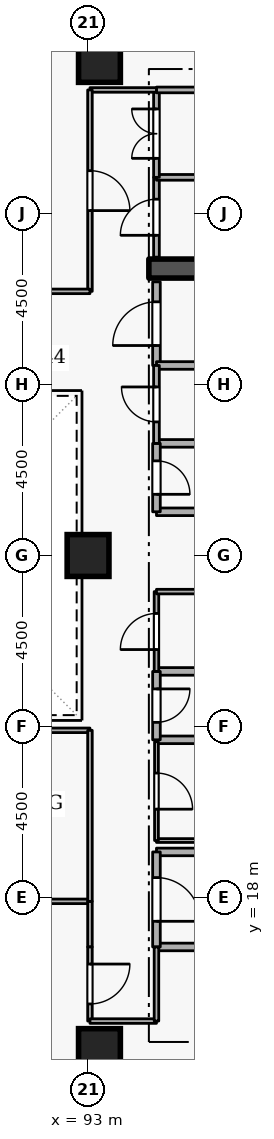
"""IFC4 building model, lengths in metres.
Left out: names, types, materials, properties, quantities, classifications, styles, units other than length and angle.
Written with IfcOpenShell. Run it as: python <this file> out.ifc"""

import sys

from ifc_helpers import new_model, si_unit, direction, frame, frame_2d, origin, origin_2d, place, context, subcontext, project, spatial, rectangle, extrude, element, fill, save


model = new_model("IFC4")
c1 = context("Model", 3, precision=1e-05, world=origin(), true_north=direction((0.0, 1.0)))
c2 = subcontext(c1, "Body", "Model", "MODEL_VIEW")
j1 = project(units=[si_unit("LENGTHUNIT", "METRE"), si_unit("PLANEANGLEUNIT", "RADIAN")], contexts=[c1])
p1 = place(None, origin())
s1 = spatial("IfcSite", under=j1, at=p1, CompositionType="ELEMENT")
p2 = place(p1, origin())
s2 = spatial("IfcBuilding", under=s1, at=p2, CompositionType="ELEMENT")
p3 = place(p2, frame((0.0, 0.0, 189.3)))
s3 = spatial("IfcBuildingStorey", under=s2, at=p3, CompositionType="ELEMENT", Elevation=189.3)
p4 = place(p3, frame((94.6, 34.55, 0.0), z_axis=(0.0, 0.0, 1.0), x_axis=(1.0, 0.0, 0.0)))
e1 = element("IfcWall", 1, at=p4, inside=s3, PredefinedType="SHEAR", context=c2, shape_type="SweptSolid", body=[
    extrude(rectangle(XDim=5.8, YDim=0.5, at=frame_2d((2.9, 0.0))), origin(), (0.0, 0.0, 1.0), 3.6),
])
for number, where, z_axis, x_axis in (
    (2, (93.3, 14.0, 0.0), (0.0, 0.0, 1.0), (1.0, 0.0, 0.0)),
    (3, (93.3, 40.0, 0.0), (0.0, 0.0, 1.0), (1.0, 0.0, 0.0)),
    (4, (93.0, 27.0, 0.0), (0.0, 0.0, 1.0), (1.0, 0.0, 0.0)),
):
    element("IfcColumn", number, at=place(p3, frame(where, z_axis=z_axis, x_axis=x_axis)), inside=s3, PredefinedType="COLUMN", context=c2, shape_type="SweptSolid", body=[
        extrude(rectangle(XDim=1.1, YDim=1.1, at=origin_2d()), origin(), (0.0, 0.0, 1.0), 3.6),
    ])
p5 = place(p3, frame((94.8, 16.7, 0.0), z_axis=(0.0, 0.0, 1.0), x_axis=(1.0, 0.0, 0.0)))
e5 = element("IfcWall", 5, at=p5, inside=s3, PredefinedType="STANDARD", context=c2, shape_type="SweptSolid", body=[
    extrude(rectangle(XDim=5.7, YDim=0.2, at=frame_2d((2.85, 0.0))), origin(), (0.0, 0.0, 1.0), 3.34),
])
p6 = place(p3, frame((97.1, 19.2, 0.0), z_axis=(0.0, 0.0, 1.0), x_axis=(-1.0, 0.0, 0.0)))
e6 = element("IfcWall", 6, at=p6, inside=s3, PredefinedType="STANDARD", context=c2, shape_type="SweptSolid", body=[
    extrude(rectangle(XDim=2.3, YDim=0.2, at=frame_2d((1.15, 0.0))), origin(), (0.0, 0.0, 1.0), 2.545),
])
p7 = place(p3, frame((94.8, 19.2, 0.0), z_axis=(0.0, 0.0, 1.0), x_axis=(0.0, -1.0, 0.0)))
e7 = element("IfcWall", 7, at=p7, inside=s3, PredefinedType="STANDARD", context=c2, shape_type="SweptSolid", body=[
    extrude(rectangle(XDim=2.5, YDim=0.2, at=frame_2d((1.25, 0.0))), origin(), (0.0, 0.0, 1.0), 3.34),
])
p8 = place(p7, frame((0.675, 0.0, 0.0)))
e8 = element("IfcOpeningElement", 8, at=p8, cuts=e7, PredefinedType="OPENING", context=c2, shape_type="SweptSolid", body=[
    extrude(rectangle(XDim=1.15, YDim=2.1, at=frame_2d((0.575, 1.05))), frame((0.0, 0.11, 0.0), z_axis=(0.0, -1.0, 0.0), x_axis=(1.0, 0.0, 0.0)), (0.0, 0.0, 1.0), 0.22),
])
for number, where, z_axis, x_axis in (
    (9, (94.8, 28.15, 0.0), (0.0, 0.0, 1.0), (1.0, 0.0, 0.0)),
    (10, (96.85, 29.95, 0.0), (0.0, 0.0, 1.0), (-1.0, 0.0, 0.0)),
):
    element("IfcWall", number, at=place(p3, frame(where, z_axis=z_axis, x_axis=x_axis)), inside=s3, PredefinedType="STANDARD", context=c2, shape_type="SweptSolid", body=[
        extrude(rectangle(XDim=2.05, YDim=0.2, at=frame_2d((1.025, 0.0))), origin(), (0.0, 0.0, 1.0), 3.34),
    ])
p9 = place(p3, frame((94.8, 29.95, 0.0), z_axis=(0.0, 0.0, 1.0), x_axis=(0.0, -1.0, 0.0)))
e11 = element("IfcWall", 11, at=p9, inside=s3, PredefinedType="STANDARD", context=c2, shape_type="SweptSolid", body=[
    extrude(rectangle(XDim=1.8, YDim=0.2, at=frame_2d((0.9, 0.0))), origin(), (0.0, 0.0, 1.0), 3.34),
])
p10 = place(p9, frame((0.46, 0.0, 0.0)))
e12 = element("IfcOpeningElement", 12, at=p10, cuts=e11, PredefinedType="OPENING", context=c2, shape_type="SweptSolid", body=[
    extrude(rectangle(XDim=0.88, YDim=2.04, at=frame_2d((0.44, 1.02))), frame((0.0, 0.11, 0.0), z_axis=(0.0, -1.0, 0.0), x_axis=(1.0, 0.0, 0.0)), (0.0, 0.0, 1.0), 0.22),
])
for number, where, z_axis, x_axis in (
    (13, (94.8, 22.15, 0.0), (0.0, 0.0, 1.0), (1.0, 0.0, 0.0)),
    (14, (96.85, 23.95, 0.0), (0.0, 0.0, 1.0), (-1.0, 0.0, 0.0)),
):
    element("IfcWall", number, at=place(p3, frame(where, z_axis=z_axis, x_axis=x_axis)), inside=s3, PredefinedType="STANDARD", context=c2, shape_type="SweptSolid", body=[
        extrude(rectangle(XDim=2.05, YDim=0.2, at=frame_2d((1.025, 0.0))), origin(), (0.0, 0.0, 1.0), 3.34),
    ])
p11 = place(p3, frame((94.8, 23.95, 0.0), z_axis=(0.0, 0.0, 1.0), x_axis=(0.0, -1.0, 0.0)))
e15 = element("IfcWall", 15, at=p11, inside=s3, PredefinedType="STANDARD", context=c2, shape_type="SweptSolid", body=[
    extrude(rectangle(XDim=1.8, YDim=0.2, at=frame_2d((0.9, 0.0))), origin(), (0.0, 0.0, 1.0), 3.34),
])
p12 = place(p11, frame((0.46, 0.0, 0.0)))
e16 = element("IfcOpeningElement", 16, at=p12, cuts=e15, PredefinedType="OPENING", context=c2, shape_type="SweptSolid", body=[
    extrude(rectangle(XDim=0.88, YDim=2.04, at=frame_2d((0.44, 1.02))), frame((0.0, 0.11, 0.0), z_axis=(0.0, -1.0, 0.0), x_axis=(1.0, 0.0, 0.0)), (0.0, 0.0, 1.0), 0.22),
])
p13 = place(p3, frame((94.8, 32.0, 0.0), z_axis=(0.0, 0.0, 1.0), x_axis=(0.0, 1.0, 0.0)))
e17 = element("IfcWall", 17, at=p13, inside=s3, PredefinedType="STANDARD", context=c2, shape_type="SweptSolid", body=[
    extrude(rectangle(XDim=2.2, YDim=0.2, at=frame_2d((1.1, 0.0))), origin(), (0.0, 0.0, 1.0), 3.34),
])
p14 = place(p13, frame((0.525, 0.0, 0.0)))
e18 = element("IfcOpeningElement", 18, at=p14, cuts=e17, PredefinedType="OPENING", context=c2, shape_type="SweptSolid", body=[
    extrude(rectangle(XDim=1.15, YDim=2.1, at=frame_2d((0.575, 1.05))), frame((0.0, 0.11, 0.0), z_axis=(0.0, -1.0, 0.0), x_axis=(1.0, 0.0, 0.0)), (0.0, 0.0, 1.0), 0.22),
])
p15 = place(p3, frame((96.85, 32.0, 0.0), z_axis=(0.0, 0.0, 1.0), x_axis=(-1.0, 0.0, 0.0)))
e19 = element("IfcWall", 19, at=p15, inside=s3, PredefinedType="STANDARD", context=c2, shape_type="SweptSolid", body=[
    extrude(rectangle(XDim=2.05, YDim=0.2, at=frame_2d((1.025, 0.0))), origin(), (0.0, 0.0, 1.0), 3.34),
])
p16 = place(p3, frame((94.8, 19.5, 0.0), z_axis=(0.0, 0.0, 1.0), x_axis=(1.0, 0.0, 0.0)))
e20 = element("IfcWall", 20, at=p16, inside=s3, PredefinedType="PARTITIONING", context=c2, shape_type="SweptSolid", body=[
    extrude(rectangle(XDim=2.05, YDim=0.1, at=frame_2d((1.025, 0.0))), origin(), (0.0, 0.0, 1.0), 2.545),
])
p17 = place(p3, frame((94.8, 22.1, 0.0), z_axis=(0.0, 0.0, 1.0), x_axis=(0.0, -1.0, 0.0)))
e21 = element("IfcWall", 21, at=p17, inside=s3, PredefinedType="PARTITIONING", context=c2, shape_type="SweptSolid", body=[
    extrude(rectangle(XDim=2.6, YDim=0.1, at=frame_2d((1.3, 0.0))), origin(), (0.0, 0.0, 1.0), 3.34),
])
p18 = place(p17, frame((0.825, 0.0, 0.0)))
e22 = element("IfcOpeningElement", 22, at=p18, cuts=e21, PredefinedType="OPENING", context=c2, shape_type="SweptSolid", body=[
    extrude(rectangle(XDim=0.95, YDim=2.1, at=frame_2d((0.475, 1.05))), frame((0.0, 0.06, 0.0), z_axis=(0.0, -1.0, 0.0), x_axis=(1.0, 0.0, 0.0)), (0.0, 0.0, 1.0), 0.12),
])
p19 = place(p3, frame((94.8, 23.95, 0.0), z_axis=(0.0, 0.0, 1.0), x_axis=(0.0, 1.0, 0.0)))
e23 = element("IfcWall", 23, at=p19, inside=s3, PredefinedType="PARTITIONING", context=c2, shape_type="SweptSolid", body=[
    extrude(rectangle(XDim=2.1, YDim=0.12, at=frame_2d((1.05, 0.0))), origin(), (0.0, 0.0, 1.0), 3.34),
])
p20 = place(p19, frame((0.575, 0.0, 0.0)))
e24 = element("IfcOpeningElement", 24, at=p20, cuts=e23, PredefinedType="OPENING", context=c2, shape_type="SweptSolid", body=[
    extrude(rectangle(XDim=0.95, YDim=2.1, at=frame_2d((0.475, 1.05))), frame((0.0, 0.07, 0.0), z_axis=(0.0, -1.0, 0.0), x_axis=(1.0, 0.0, 0.0)), (0.0, 0.0, 1.0), 0.14),
])
p21 = place(p3, frame((94.8, 26.05, 0.0), z_axis=(0.0, 0.0, 1.0), x_axis=(1.0, 0.0, 0.0)))
e25 = element("IfcWall", 25, at=p21, inside=s3, PredefinedType="PARTITIONING", context=c2, shape_type="SweptSolid", body=[
    extrude(rectangle(XDim=2.05, YDim=0.12, at=frame_2d((1.025, 0.0))), origin(), (0.0, 0.0, 1.0), 3.34),
])
p22 = place(p3, frame((94.8, 29.95, 0.0), z_axis=(0.0, 0.0, 1.0), x_axis=(0.0, 1.0, 0.0)))
e26 = element("IfcWall", 26, at=p22, inside=s3, PredefinedType="PARTITIONING", context=c2, shape_type="SweptSolid", body=[
    extrude(rectangle(XDim=2.05, YDim=0.15, at=frame_2d((1.025, 0.0))), origin(), (0.0, 0.0, 1.0), 3.34),
])
p23 = place(p22, frame((0.565, 0.0, 0.0)))
e27 = element("IfcOpeningElement", 27, at=p23, cuts=e26, PredefinedType="OPENING", context=c2, shape_type="SweptSolid", body=[
    extrude(rectangle(XDim=0.92, YDim=2.08, at=frame_2d((0.46, 1.04))), frame((0.0, 0.085, 0.0), z_axis=(0.0, -1.0, 0.0), x_axis=(1.0, 0.0, 0.0)), (0.0, 0.0, 1.0), 0.17),
])
p24 = place(p3, frame((94.8, 34.85, 0.0), z_axis=(0.0, 0.0, 1.0), x_axis=(0.0, 1.0, 0.0)))
e28 = element("IfcWall", 28, at=p24, inside=s3, PredefinedType="PARTITIONING", context=c2, shape_type="SweptSolid", body=[
    extrude(rectangle(XDim=2.1, YDim=0.15, at=frame_2d((1.05, 0.0))), origin(), (0.0, 0.0, 1.0), 3.34),
])
p25 = place(p24, frame((0.575, 0.0, 0.0)))
e29 = element("IfcOpeningElement", 29, at=p25, cuts=e28, PredefinedType="OPENING", context=c2, shape_type="SweptSolid", body=[
    extrude(rectangle(XDim=0.95, YDim=2.1, at=frame_2d((0.475, 1.05))), frame((0.0, 0.085, 0.0), z_axis=(0.0, -1.0, 0.0), x_axis=(1.0, 0.0, 0.0)), (0.0, 0.0, 1.0), 0.17),
])
p26 = place(p3, frame((94.8, 36.95, 0.0), z_axis=(0.0, 0.0, 1.0), x_axis=(1.0, 0.0, 0.0)))
e30 = element("IfcWall", 30, at=p26, inside=s3, PredefinedType="PARTITIONING", context=c2, shape_type="SweptSolid", body=[
    extrude(rectangle(XDim=5.65, YDim=0.15, at=frame_2d((2.825, 0.0))), origin(), (0.0, 0.0, 1.0), 3.34),
])
p27 = place(p3, frame((94.8, 36.95, 0.0), z_axis=(0.0, 0.0, 1.0), x_axis=(0.0, 1.0, 0.0)))
e31 = element("IfcWall", 31, at=p27, inside=s3, PredefinedType="PARTITIONING", context=c2, shape_type="SweptSolid", body=[
    extrude(rectangle(XDim=2.3, YDim=0.15, at=frame_2d((1.15, 0.0))), origin(), (0.0, 0.0, 1.0), 3.34),
])
p28 = place(p27, frame((0.5, 0.0, 0.0)))
e32 = element("IfcOpeningElement", 32, at=p28, cuts=e31, PredefinedType="OPENING", context=c2, shape_type="SweptSolid", body=[
    extrude(rectangle(XDim=1.3, YDim=2.12, at=frame_2d((0.65, 1.06))), frame((0.0, 0.085, 0.0), z_axis=(0.0, -1.0, 0.0), x_axis=(1.0, 0.0, 0.0)), (0.0, 0.0, 1.0), 0.17),
])
p29 = place(p3, frame((94.8, 39.25, 0.0), z_axis=(0.0, 0.0, 1.0), x_axis=(1.0, 0.0, 0.0)))
e33 = element("IfcWall", 33, at=p29, inside=s3, PredefinedType="PARTITIONING", context=c2, shape_type="SweptSolid", body=[
    extrude(rectangle(XDim=5.65, YDim=0.15, at=frame_2d((2.825, 0.0))), origin(), (0.0, 0.0, 1.0), 3.34),
])
p30 = place(p3, frame((88.5, 17.9, 0.0), z_axis=(0.0, 0.0, 1.0), x_axis=(1.0, 0.0, 0.0)))
e34 = element("IfcWall", 34, at=p30, inside=s3, PredefinedType="PARTITIONING", context=c2, shape_type="SweptSolid", body=[
    extrude(rectangle(XDim=4.55, YDim=0.12, at=frame_2d((2.275, 0.0))), origin(), (0.0, 0.0, 1.0), 3.34),
])
p31 = place(p3, frame((93.05, 17.9, 0.0), z_axis=(0.0, 0.0, 1.0), x_axis=(0.0, -1.0, 0.0)))
e35 = element("IfcWall", 35, at=p31, inside=s3, PredefinedType="PARTITIONING", context=c2, shape_type="SweptSolid", body=[
    extrude(rectangle(XDim=1.2, YDim=0.12, at=frame_2d((0.6, 0.0))), origin(), (0.0, 0.0, 1.0), 3.34),
])
p32 = place(p3, frame((93.05, 16.7, 0.0), z_axis=(0.0, 0.0, 1.0), x_axis=(0.0, -1.0, 0.0)))
e36 = element("IfcWall", 36, at=p32, inside=s3, PredefinedType="PARTITIONING", context=c2, shape_type="SweptSolid", body=[
    extrude(rectangle(XDim=1.95, YDim=0.12, at=frame_2d((0.975, 0.0))), origin(), (0.0, 0.0, 1.0), 3.34),
])
p33 = place(p32, frame((0.45, 0.0, 0.0)))
e37 = element("IfcOpeningElement", 37, at=p33, cuts=e36, PredefinedType="OPENING", context=c2, shape_type="SweptSolid", body=[
    extrude(rectangle(XDim=1.05, YDim=2.1, at=frame_2d((0.525, 1.05))), frame((0.0, 0.07, 0.0), z_axis=(0.0, -1.0, 0.0), x_axis=(1.0, 0.0, 0.0)), (0.0, 0.0, 1.0), 0.14),
])
p34 = place(p3, frame((93.05, 14.75, 0.0), z_axis=(0.0, 0.0, 1.0), x_axis=(1.0, 0.0, 0.0)))
e38 = element("IfcWall", 38, at=p34, inside=s3, PredefinedType="PARTITIONING", context=c2, shape_type="SweptSolid", body=[
    extrude(rectangle(XDim=1.75, YDim=0.12, at=frame_2d((0.875, 0.0))), origin(), (0.0, 0.0, 1.0), 3.34),
])
p35 = place(p3, frame((94.8, 14.75, 0.0), z_axis=(0.0, 0.0, 1.0), x_axis=(0.0, 1.0, 0.0)))
e39 = element("IfcWall", 39, at=p35, inside=s3, PredefinedType="PARTITIONING", context=c2, shape_type="SweptSolid", body=[
    extrude(rectangle(XDim=1.95, YDim=0.12, at=frame_2d((0.975, 0.0))), origin(), (0.0, 0.0, 1.0), 3.34),
])
p36 = place(p3, frame((83.95, 22.4, 0.0), z_axis=(0.0, 0.0, 1.0), x_axis=(1.0, 0.0, 0.0)))
e40 = element("IfcWall", 40, at=p36, inside=s3, PredefinedType="PARTITIONING", context=c2, shape_type="SweptSolid", body=[
    extrude(rectangle(XDim=9.1, YDim=0.12, at=frame_2d((4.55, 0.0))), origin(), (0.0, 0.0, 1.0), 3.34),
])
p37 = place(p3, frame((93.05, 22.4, 0.0), z_axis=(0.0, 0.0, 1.0), x_axis=(0.0, -1.0, 0.0)))
e41 = element("IfcWall", 41, at=p37, inside=s3, PredefinedType="PARTITIONING", context=c2, shape_type="SweptSolid", body=[
    extrude(rectangle(XDim=4.5, YDim=0.12, at=frame_2d((2.25, 0.0))), origin(), (0.0, 0.0, 1.0), 3.34),
])
p38 = place(p3, frame((94.8, 39.25, 0.0), z_axis=(0.0, 0.0, 1.0), x_axis=(-1.0, 0.0, 0.0)))
e42 = element("IfcWall", 42, at=p38, inside=s3, PredefinedType="PARTITIONING", context=c2, shape_type="SweptSolid", body=[
    extrude(rectangle(XDim=1.75, YDim=0.12, at=frame_2d((0.875, 0.0))), origin(), (0.0, 0.0, 1.0), 3.34),
])
p39 = place(p3, frame((93.05, 39.25, 0.0), z_axis=(0.0, 0.0, 1.0), x_axis=(0.0, -1.0, 0.0)))
e43 = element("IfcWall", 43, at=p39, inside=s3, PredefinedType="PARTITIONING", context=c2, shape_type="SweptSolid", body=[
    extrude(rectangle(XDim=5.3, YDim=0.12, at=frame_2d((2.65, 0.0))), origin(), (0.0, 0.0, 1.0), 3.34),
])
p40 = place(p39, frame((2.125, 0.0, 0.0)))
e44 = element("IfcOpeningElement", 44, at=p40, cuts=e43, PredefinedType="OPENING", context=c2, shape_type="SweptSolid", body=[
    extrude(rectangle(XDim=1.05, YDim=2.1, at=frame_2d((0.525, 1.05))), frame((0.0, 0.07, 0.0), z_axis=(0.0, -1.0, 0.0), x_axis=(1.0, 0.0, 0.0)), (0.0, 0.0, 1.0), 0.14),
])
p41 = place(p3, frame((93.05, 33.95, 0.0), z_axis=(0.0, 0.0, 1.0), x_axis=(-1.0, 0.0, 0.0)))
e45 = element("IfcWall", 45, at=p41, inside=s3, PredefinedType="PARTITIONING", context=c2, shape_type="SweptSolid", body=[
    extrude(rectangle(XDim=2.95, YDim=0.12, at=frame_2d((1.475, 0.0))), origin(), (0.0, 0.0, 1.0), 3.34),
])
p42 = place(p8, origin())
e46 = element("IfcDoor", 46, at=p42, inside=s3, OperationType="SINGLE_SWING_RIGHT", PredefinedType="DOOR", context=c2, shape_type="SweptSolid", body=[
    extrude(rectangle(XDim=1.15, YDim=2.1, at=frame_2d((0.575, 1.05))), frame((0.0, 0.025, 0.0), z_axis=(0.0, -1.0, 0.0), x_axis=(1.0, 0.0, 0.0)), (0.0, 0.0, 1.0), 0.05),
])
fill(e8, e46)
p43 = place(p10, origin())
e47 = element("IfcDoor", 47, at=p43, inside=s3, OperationType="SINGLE_SWING_RIGHT", PredefinedType="DOOR", context=c2, shape_type="SweptSolid", body=[
    extrude(rectangle(XDim=0.88, YDim=2.04, at=frame_2d((0.44, 1.02))), frame((0.0, 0.025, 0.0), z_axis=(0.0, -1.0, 0.0), x_axis=(1.0, 0.0, 0.0)), (0.0, 0.0, 1.0), 0.05),
])
fill(e12, e47)
p44 = place(p12, origin())
e48 = element("IfcDoor", 48, at=p44, inside=s3, OperationType="SINGLE_SWING_LEFT", PredefinedType="DOOR", context=c2, shape_type="SweptSolid", body=[
    extrude(rectangle(XDim=0.88, YDim=2.04, at=frame_2d((0.44, 1.02))), frame((0.0, 0.025, 0.0), z_axis=(0.0, -1.0, 0.0), x_axis=(1.0, 0.0, 0.0)), (0.0, 0.0, 1.0), 0.05),
])
fill(e16, e48)
p45 = place(p18, origin())
e49 = element("IfcDoor", 49, at=p45, inside=s3, OperationType="SINGLE_SWING_RIGHT", PredefinedType="DOOR", context=c2, shape_type="SweptSolid", body=[
    extrude(rectangle(XDim=0.95, YDim=2.1, at=frame_2d((0.475, 1.05))), frame((0.0, 0.025, 0.0), z_axis=(0.0, -1.0, 0.0), x_axis=(1.0, 0.0, 0.0)), (0.0, 0.0, 1.0), 0.05),
])
fill(e22, e49)
p46 = place(p20, origin())
e50 = element("IfcDoor", 50, at=p46, inside=s3, OperationType="SINGLE_SWING_LEFT", PredefinedType="DOOR", context=c2, shape_type="SweptSolid", body=[
    extrude(rectangle(XDim=0.95, YDim=2.1, at=frame_2d((0.475, 1.05))), frame((0.0, 0.025, 0.0), z_axis=(0.0, -1.0, 0.0), x_axis=(1.0, 0.0, 0.0)), (0.0, 0.0, 1.0), 0.05),
])
fill(e24, e50)
p47 = place(p23, origin())
e51 = element("IfcDoor", 51, at=p47, inside=s3, OperationType="SINGLE_SWING_RIGHT", PredefinedType="DOOR", context=c2, shape_type="SweptSolid", body=[
    extrude(rectangle(XDim=0.92, YDim=2.08, at=frame_2d((0.46, 1.04))), frame((0.0, 0.025, 0.0), z_axis=(0.0, -1.0, 0.0), x_axis=(1.0, 0.0, 0.0)), (0.0, 0.0, 1.0), 0.05),
])
fill(e27, e51)
p48 = place(p14, origin())
e52 = element("IfcDoor", 52, at=p48, inside=s3, OperationType="SINGLE_SWING_LEFT", PredefinedType="DOOR", context=c2, shape_type="SweptSolid", body=[
    extrude(rectangle(XDim=1.15, YDim=2.1, at=frame_2d((0.575, 1.05))), frame((0.0, 0.025, 0.0), z_axis=(0.0, -1.0, 0.0), x_axis=(1.0, 0.0, 0.0)), (0.0, 0.0, 1.0), 0.05),
])
fill(e18, e52)
p49 = place(p25, origin())
e53 = element("IfcDoor", 53, at=p49, inside=s3, OperationType="SINGLE_SWING_LEFT", PredefinedType="DOOR", context=c2, shape_type="SweptSolid", body=[
    extrude(rectangle(XDim=0.95, YDim=2.1, at=frame_2d((0.475, 1.05))), frame((0.0, 0.025, 0.0), z_axis=(0.0, -1.0, 0.0), x_axis=(1.0, 0.0, 0.0)), (0.0, 0.0, 1.0), 0.05),
])
fill(e29, e53)
p50 = place(p28, origin())
e54 = element("IfcDoor", 54, at=p50, inside=s3, OperationType="DOUBLE_DOOR_SINGLE_SWING", PredefinedType="DOOR", context=c2, shape_type="SweptSolid", body=[
    extrude(rectangle(XDim=1.3, YDim=2.12, at=frame_2d((0.65, 1.06))), frame((0.0, 0.025, 0.0), z_axis=(0.0, -1.0, 0.0), x_axis=(1.0, 0.0, 0.0)), (0.0, 0.0, 1.0), 0.05),
])
fill(e32, e54)
p51 = place(p33, origin())
e55 = element("IfcDoor", 55, at=p51, inside=s3, OperationType="SINGLE_SWING_LEFT", PredefinedType="DOOR", context=c2, shape_type="SweptSolid", body=[
    extrude(rectangle(XDim=1.05, YDim=2.1, at=frame_2d((0.525, 1.05))), frame((0.0, 0.025, 0.0), z_axis=(0.0, -1.0, 0.0), x_axis=(1.0, 0.0, 0.0)), (0.0, 0.0, 1.0), 0.05),
])
fill(e37, e55)
p52 = place(p40, origin())
e56 = element("IfcDoor", 56, at=p52, inside=s3, OperationType="SINGLE_SWING_RIGHT", PredefinedType="DOOR", context=c2, shape_type="SweptSolid", body=[
    extrude(rectangle(XDim=1.05, YDim=2.1, at=frame_2d((0.525, 1.05))), frame((0.0, 0.025, 0.0), z_axis=(0.0, -1.0, 0.0), x_axis=(1.0, 0.0, 0.0)), (0.0, 0.0, 1.0), 0.05),
])
fill(e44, e56)
save(model, sys.argv[1])
